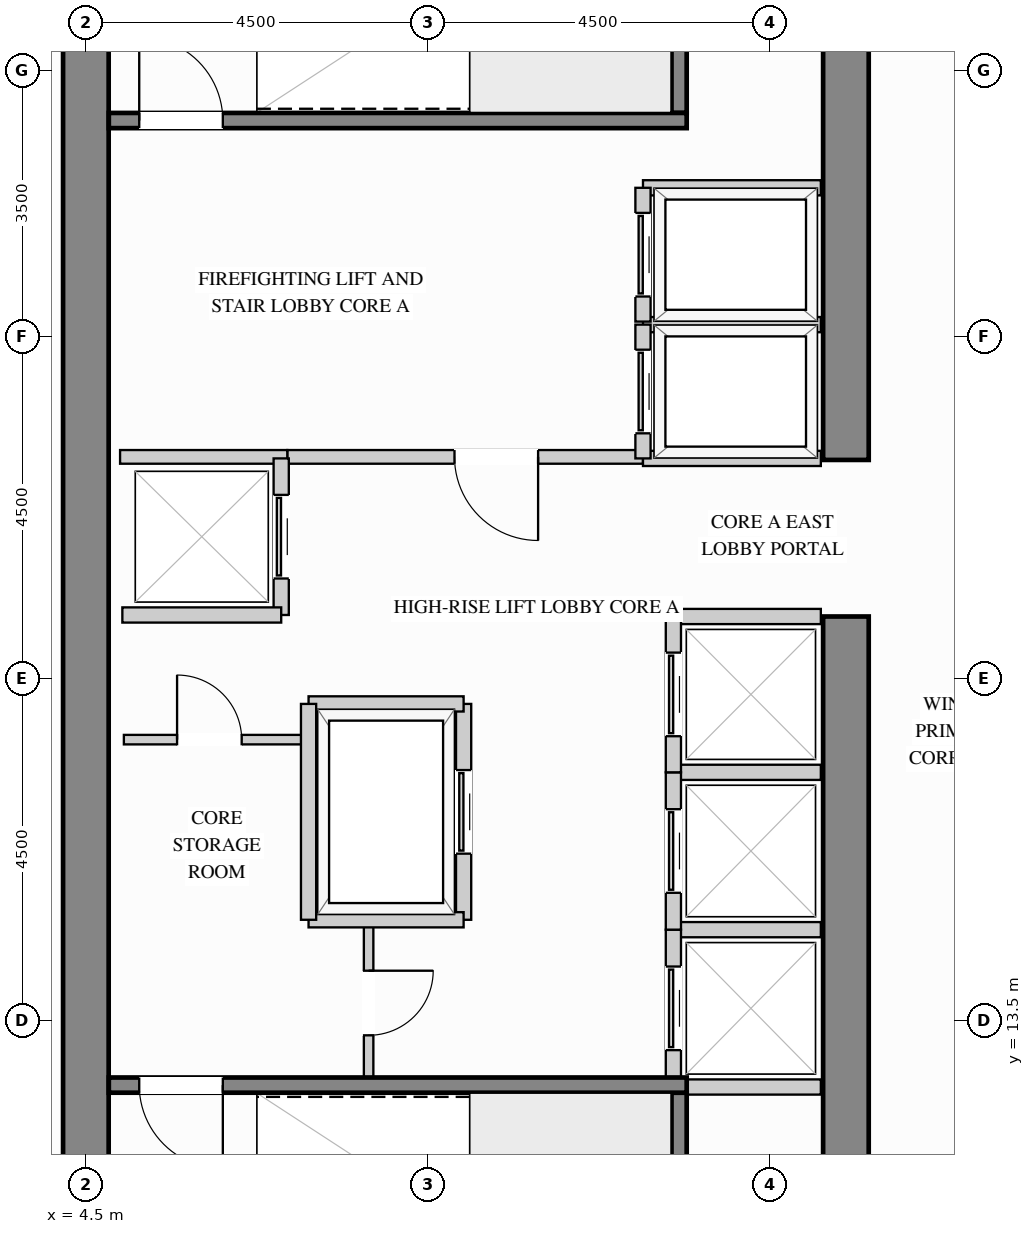
"""IFC4 building model, lengths in metres.
Left out: names, types, materials, properties, quantities, classifications, styles, units other than length and angle.
Written with IfcOpenShell. Run it as: python <this file> out.ifc"""

import sys

from ifc_helpers import new_model, si_unit, direction, frame, frame_2d, origin, place, context, subcontext, project, spatial, rectangle, extrude, source, transform, mapped, element, fill, save


model = new_model("IFC4")
c1 = context("Model", 3, precision=1e-05, world=origin(), true_north=direction((0.0, 1.0)))
c2 = subcontext(c1, "Body", "Model", "MODEL_VIEW")
j1 = project(units=[si_unit("LENGTHUNIT", "METRE"), si_unit("PLANEANGLEUNIT", "RADIAN")], contexts=[c1])
p1 = place(None, origin())
s1 = spatial("IfcSite", under=j1, at=p1, CompositionType="ELEMENT")
p2 = place(p1, origin())
s2 = spatial("IfcBuilding", under=s1, at=p2, CompositionType="ELEMENT")
p3 = place(p2, frame((0.0, 0.0, 182.7)))
s3 = spatial("IfcBuildingStorey", under=s2, at=p3, CompositionType="ELEMENT", Elevation=182.7)
m1 = source(origin(), c2, "Body", "SweptSolid", [
    extrude(rectangle(XDim=10.02, YDim=0.6, at=frame_2d((5.01, 0.0))), origin(), (0.0, 0.0, 1.0), 3.4),
])
p4 = place(p3, frame((14.5, 8.8, 0.0), z_axis=(0.0, 0.0, 1.0), x_axis=(0.0, 1.0, 0.0)))
e1 = element("IfcWall", 1, at=p4, inside=s3, PredefinedType="SHEAR", context=c2, shape_type="MappedRepresentation", body=[
    mapped(m1, transform((0.0, 0.0, 0.0), x_axis=(1.0, 0.0, 0.0), y_axis=(0.0, 1.0, 0.0), z_axis=(0.0, 0.0, 1.0))),
])
m2 = source(origin(), c2, "Body", "SweptSolid", [
    extrude(rectangle(XDim=8.32, YDim=0.6, at=frame_2d((4.16, 0.0))), origin(), (0.0, 0.0, 1.0), 3.4),
])
p5 = place(p3, frame((14.5, 20.88, 0.0), z_axis=(0.0, 0.0, 1.0), x_axis=(0.0, 1.0, 0.0)))
e2 = element("IfcWall", 2, at=p5, inside=s3, PredefinedType="SHEAR", context=c2, shape_type="MappedRepresentation", body=[
    mapped(m2, transform((0.0, 0.0, 0.0), x_axis=(1.0, 0.0, 0.0), y_axis=(0.0, 1.0, 0.0), z_axis=(0.0, 0.0, 1.0))),
])
m3 = source(origin(), c2, "Body", "SweptSolid", [
    extrude(rectangle(XDim=20.4, YDim=0.6, at=frame_2d((10.2, 0.0))), origin(), (0.0, 0.0, 1.0), 3.4),
])
p6 = place(p3, frame((4.5, 8.8, 0.0), z_axis=(0.0, 0.0, 1.0), x_axis=(0.0, 1.0, 0.0)))
e3 = element("IfcWall", 3, at=p6, inside=s3, PredefinedType="SHEAR", context=c2, shape_type="MappedRepresentation", body=[
    mapped(m3, transform((0.0, 0.0, 0.0), x_axis=(1.0, 0.0, 0.0), y_axis=(0.0, 1.0, 0.0), z_axis=(0.0, 0.0, 1.0))),
])
p7 = place(p3, frame((7.15, 20.92, 0.0), z_axis=(0.0, 0.0, 1.0), x_axis=(1.0, 0.0, 0.0)))
e4 = element("IfcWall", 4, at=p7, inside=s3, PredefinedType="PARTITIONING", context=c2, shape_type="SweptSolid", body=[
    extrude(rectangle(XDim=4.68, YDim=0.18, at=frame_2d((2.34, 0.0))), origin(), (0.0, 0.0, 1.0), 3.385),
])
p8 = place(p7, frame((2.2, 0.0, 0.0)))
e5 = element("IfcOpeningElement", 5, at=p8, cuts=e4, PredefinedType="OPENING", context=c2, shape_type="SweptSolid", body=[
    extrude(rectangle(XDim=1.1, YDim=2.15, at=frame_2d((0.55, 1.075))), frame((0.0, 0.1, 0.0), z_axis=(0.0, -1.0, 0.0), x_axis=(1.0, 0.0, 0.0)), (0.0, 0.0, 1.0), 0.2),
])
m4 = source(origin(), c2, "Body", "SweptSolid", [
    extrude(rectangle(XDim=2.2, YDim=0.18, at=frame_2d((1.1, 0.0))), origin(), (0.0, 0.0, 1.0), 3.385),
])
p9 = place(p3, frame((4.95, 20.92, 0.0), z_axis=(0.0, 0.0, 1.0), x_axis=(1.0, 0.0, 0.0)))
e6 = element("IfcWall", 6, at=p9, inside=s3, PredefinedType="PARTITIONING", context=c2, shape_type="MappedRepresentation", body=[
    mapped(m4, transform((0.0, 0.0, 0.0), x_axis=(1.0, 0.0, 0.0), y_axis=(0.0, 1.0, 0.0), z_axis=(0.0, 0.0, 1.0))),
])
p10 = place(p3, frame((8.22, 12.75, 0.0), z_axis=(0.0, 0.0, 1.0), x_axis=(0.0, 1.0, 0.0)))
e7 = element("IfcWall", 7, at=p10, inside=s3, PredefinedType="PARTITIONING", context=c2, shape_type="SweptSolid", body=[
    extrude(rectangle(XDim=2.07, YDim=0.125, at=frame_2d((1.035, 0.0))), origin(), (0.0, 0.0, 1.0), 3.385),
])
p11 = place(p10, frame((0.56, 0.0, 0.0)))
e8 = element("IfcOpeningElement", 8, at=p11, cuts=e7, PredefinedType="OPENING", context=c2, shape_type="SweptSolid", body=[
    extrude(rectangle(XDim=0.85, YDim=2.1, at=frame_2d((0.425, 1.05))), frame((0.0, 0.073, 0.0), z_axis=(0.0, -1.0, 0.0), x_axis=(1.0, 0.0, 0.0)), (0.0, 0.0, 1.0), 0.145),
])
p12 = place(p3, frame((5.0, 17.2, 0.0), z_axis=(0.0, 0.0, 1.0), x_axis=(1.0, 0.0, 0.0)))
e9 = element("IfcWall", 9, at=p12, inside=s3, PredefinedType="PARTITIONING", context=c2, shape_type="SweptSolid", body=[
    extrude(rectangle(XDim=2.4, YDim=0.125, at=frame_2d((1.2, 0.0))), origin(), (0.0, 0.0, 1.0), 3.385),
])
p13 = place(p12, frame((0.7, 0.0, 0.0)))
e10 = element("IfcOpeningElement", 10, at=p13, cuts=e9, PredefinedType="OPENING", context=c2, shape_type="SweptSolid", body=[
    extrude(rectangle(XDim=0.85, YDim=2.1, at=frame_2d((0.425, 1.05))), frame((0.0, 0.073, 0.0), z_axis=(0.0, -1.0, 0.0), x_axis=(1.0, 0.0, 0.0)), (0.0, 0.0, 1.0), 0.145),
])
m5 = source(origin(), c2, "Body", "SweptSolid", [
    extrude(rectangle(XDim=2.34, YDim=0.2, at=frame_2d((1.17, 0.0))), origin(), (0.0, 0.0, 1.0), 3.385),
])
for number, where, z_axis, x_axis in (
    (11, (11.83, 22.66, 0.0), (0.0, 0.0, 1.0), (1.0, 0.0, 0.0)),
    (12, (11.83, 20.9, 0.0), (0.0, 0.0, 1.0), (1.0, 0.0, 0.0)),
):
    element("IfcWall", number, at=place(p3, frame(where, z_axis=z_axis, x_axis=x_axis)), inside=s3, PredefinedType="PARTITIONING", context=c2, shape_type="MappedRepresentation", body=[
        mapped(m5, transform((0.0, 0.0, 0.0), x_axis=(1.0, 0.0, 0.0), y_axis=(0.0, 1.0, 0.0), z_axis=(0.0, 0.0, 1.0))),
    ])
p14 = place(p3, frame((11.83, 20.9, 0.0), z_axis=(0.0, 0.0, 1.0), x_axis=(0.0, 1.0, 0.0)))
e13 = element("IfcWall", 13, at=p14, inside=s3, PredefinedType="PARTITIONING", context=c2, shape_type="SweptSolid", body=[
    extrude(rectangle(XDim=1.76, YDim=0.2, at=frame_2d((0.88, 0.0))), origin(), (0.0, 0.0, 1.0), 3.385),
])
p15 = place(p14, frame((0.33, 0.0, 0.0)))
e14 = element("IfcOpeningElement", 14, at=p15, cuts=e13, PredefinedType="OPENING", context=c2, shape_type="SweptSolid", body=[
    extrude(rectangle(XDim=1.1, YDim=2.2, at=frame_2d((0.55, 1.1))), frame((0.0, 0.11, 0.0), z_axis=(0.0, -1.0, 0.0), x_axis=(1.0, 0.0, 0.0)), (0.0, 0.0, 1.0), 0.22),
])
p16 = place(p3, frame((11.83, 24.46, 0.0), z_axis=(0.0, 0.0, 1.0), x_axis=(1.0, 0.0, 0.0)))
e15 = element("IfcWall", 15, at=p16, inside=s3, PredefinedType="PARTITIONING", context=c2, shape_type="MappedRepresentation", body=[
    mapped(m5, transform((0.0, 0.0, 0.0), x_axis=(1.0, 0.0, 0.0), y_axis=(0.0, 1.0, 0.0), z_axis=(0.0, 0.0, 1.0))),
])
p17 = place(p3, frame((11.83, 22.7, 0.0), z_axis=(0.0, 0.0, 1.0), x_axis=(0.0, 1.0, 0.0)))
e16 = element("IfcWall", 16, at=p17, inside=s3, PredefinedType="PARTITIONING", context=c2, shape_type="SweptSolid", body=[
    extrude(rectangle(XDim=1.76, YDim=0.2, at=frame_2d((0.88, 0.0))), origin(), (0.0, 0.0, 1.0), 3.385),
])
p18 = place(p17, frame((0.33, 0.0, 0.0)))
e17 = element("IfcOpeningElement", 17, at=p18, cuts=e16, PredefinedType="OPENING", context=c2, shape_type="SweptSolid", body=[
    extrude(rectangle(XDim=1.1, YDim=2.2, at=frame_2d((0.55, 1.1))), frame((0.0, 0.11, 0.0), z_axis=(0.0, -1.0, 0.0), x_axis=(1.0, 0.0, 0.0)), (0.0, 0.0, 1.0), 0.22),
])
m6 = source(origin(), c2, "Body", "SweptSolid", [
    extrude(rectangle(XDim=1.94, YDim=0.2, at=frame_2d((0.97, 0.0))), origin(), (0.0, 0.0, 1.0), 3.385),
])
for number, where, z_axis, x_axis in (
    (18, (12.23, 14.7, 0.0), (0.0, 0.0, 1.0), (1.0, 0.0, 0.0)),
    (19, (12.23, 12.63, 0.0), (0.0, 0.0, 1.0), (1.0, 0.0, 0.0)),
):
    element("IfcWall", number, at=place(p3, frame(where, z_axis=z_axis, x_axis=x_axis)), inside=s3, PredefinedType="PARTITIONING", context=c2, shape_type="MappedRepresentation", body=[
        mapped(m6, transform((0.0, 0.0, 0.0), x_axis=(1.0, 0.0, 0.0), y_axis=(0.0, 1.0, 0.0), z_axis=(0.0, 0.0, 1.0))),
    ])
p19 = place(p3, frame((12.23, 12.63, 0.0), z_axis=(0.0, 0.0, 1.0), x_axis=(0.0, 1.0, 0.0)))
e20 = element("IfcWall", 20, at=p19, inside=s3, PredefinedType="PARTITIONING", context=c2, shape_type="SweptSolid", body=[
    extrude(rectangle(XDim=2.07, YDim=0.2, at=frame_2d((1.035, 0.0))), origin(), (0.0, 0.0, 1.0), 3.385),
])
p20 = place(p19, frame((0.485, 0.0, 0.0)))
e21 = element("IfcOpeningElement", 21, at=p20, cuts=e20, PredefinedType="OPENING", context=c2, shape_type="SweptSolid", body=[
    extrude(rectangle(XDim=1.1, YDim=2.2, at=frame_2d((0.55, 1.1))), frame((0.0, 0.11, 0.0), z_axis=(0.0, -1.0, 0.0), x_axis=(1.0, 0.0, 0.0)), (0.0, 0.0, 1.0), 0.22),
])
p21 = place(p3, frame((12.23, 16.77, 0.0), z_axis=(0.0, 0.0, 1.0), x_axis=(1.0, 0.0, 0.0)))
e22 = element("IfcWall", 22, at=p21, inside=s3, PredefinedType="PARTITIONING", context=c2, shape_type="MappedRepresentation", body=[
    mapped(m6, transform((0.0, 0.0, 0.0), x_axis=(1.0, 0.0, 0.0), y_axis=(0.0, 1.0, 0.0), z_axis=(0.0, 0.0, 1.0))),
])
p22 = place(p3, frame((12.23, 14.7, 0.0), z_axis=(0.0, 0.0, 1.0), x_axis=(0.0, 1.0, 0.0)))
e23 = element("IfcWall", 23, at=p22, inside=s3, PredefinedType="PARTITIONING", context=c2, shape_type="SweptSolid", body=[
    extrude(rectangle(XDim=2.07, YDim=0.2, at=frame_2d((1.035, 0.0))), origin(), (0.0, 0.0, 1.0), 3.385),
])
p23 = place(p22, frame((0.485, 0.0, 0.0)))
e24 = element("IfcOpeningElement", 24, at=p23, cuts=e23, PredefinedType="OPENING", context=c2, shape_type="SweptSolid", body=[
    extrude(rectangle(XDim=1.1, YDim=2.2, at=frame_2d((0.55, 1.1))), frame((0.0, 0.11, 0.0), z_axis=(0.0, -1.0, 0.0), x_axis=(1.0, 0.0, 0.0)), (0.0, 0.0, 1.0), 0.22),
])
p24 = place(p3, frame((12.23, 18.82, 0.0), z_axis=(0.0, 0.0, 1.0), x_axis=(1.0, 0.0, 0.0)))
e25 = element("IfcWall", 25, at=p24, inside=s3, PredefinedType="PARTITIONING", context=c2, shape_type="MappedRepresentation", body=[
    mapped(m6, transform((0.0, 0.0, 0.0), x_axis=(1.0, 0.0, 0.0), y_axis=(0.0, 1.0, 0.0), z_axis=(0.0, 0.0, 1.0))),
])
p25 = place(p3, frame((12.23, 16.77, 0.0), z_axis=(0.0, 0.0, 1.0), x_axis=(0.0, 1.0, 0.0)))
e26 = element("IfcWall", 26, at=p25, inside=s3, PredefinedType="PARTITIONING", context=c2, shape_type="SweptSolid", body=[
    extrude(rectangle(XDim=2.05, YDim=0.2, at=frame_2d((1.025, 0.0))), origin(), (0.0, 0.0, 1.0), 3.385),
])
p26 = place(p25, frame((0.475, 0.0, 0.0)))
e27 = element("IfcOpeningElement", 27, at=p26, cuts=e26, PredefinedType="OPENING", context=c2, shape_type="SweptSolid", body=[
    extrude(rectangle(XDim=1.1, YDim=2.2, at=frame_2d((0.55, 1.1))), frame((0.0, 0.11, 0.0), z_axis=(0.0, -1.0, 0.0), x_axis=(1.0, 0.0, 0.0)), (0.0, 0.0, 1.0), 0.22),
])
p27 = place(p3, frame((7.07, 18.84, 0.0), z_axis=(0.0, 0.0, 1.0), x_axis=(0.0, 1.0, 0.0)))
e28 = element("IfcWall", 28, at=p27, inside=s3, PredefinedType="PARTITIONING", context=c2, shape_type="SweptSolid", body=[
    extrude(rectangle(XDim=2.06, YDim=0.2, at=frame_2d((1.03, 0.0))), origin(), (0.0, 0.0, 1.0), 3.385),
])
p28 = place(p27, frame((0.48, 0.0, 0.0)))
e29 = element("IfcOpeningElement", 29, at=p28, cuts=e28, PredefinedType="OPENING", context=c2, shape_type="SweptSolid", body=[
    extrude(rectangle(XDim=1.1, YDim=2.2, at=frame_2d((0.55, 1.1))), frame((0.0, 0.11, 0.0), z_axis=(0.0, -1.0, 0.0), x_axis=(1.0, 0.0, 0.0)), (0.0, 0.0, 1.0), 0.22),
])
m7 = source(origin(), c2, "Body", "SweptSolid", [
    extrude(rectangle(XDim=2.09, YDim=0.2, at=frame_2d((1.045, 0.0))), origin(), (0.0, 0.0, 1.0), 3.385),
])
p29 = place(p3, frame((4.98, 18.84, 0.0), z_axis=(0.0, 0.0, 1.0), x_axis=(1.0, 0.0, 0.0)))
e30 = element("IfcWall", 30, at=p29, inside=s3, PredefinedType="PARTITIONING", context=c2, shape_type="MappedRepresentation", body=[
    mapped(m7, transform((0.0, 0.0, 0.0), x_axis=(1.0, 0.0, 0.0), y_axis=(0.0, 1.0, 0.0), z_axis=(0.0, 0.0, 1.0))),
])
p30 = place(p3, frame((9.47, 14.83, 0.0), z_axis=(0.0, 0.0, 1.0), x_axis=(0.0, 1.0, 0.0)))
e31 = element("IfcWall", 31, at=p30, inside=s3, PredefinedType="PARTITIONING", context=c2, shape_type="SweptSolid", body=[
    extrude(rectangle(XDim=2.84, YDim=0.2, at=frame_2d((1.42, 0.0))), origin(), (0.0, 0.0, 1.0), 3.385),
])
p31 = place(p30, frame((0.87, 0.0, 0.0)))
e32 = element("IfcOpeningElement", 32, at=p31, cuts=e31, PredefinedType="OPENING", context=c2, shape_type="SweptSolid", body=[
    extrude(rectangle(XDim=1.1, YDim=2.2, at=frame_2d((0.55, 1.1))), frame((0.0, 0.11, 0.0), z_axis=(0.0, -1.0, 0.0), x_axis=(1.0, 0.0, 0.0)), (0.0, 0.0, 1.0), 0.22),
])
m8 = source(origin(), c2, "Body", "SweptSolid", [
    extrude(rectangle(XDim=2.04, YDim=0.2, at=frame_2d((1.02, 0.0))), origin(), (0.0, 0.0, 1.0), 3.385),
])
for number, where, z_axis, x_axis in (
    (33, (7.43, 17.67, 0.0), (0.0, 0.0, 1.0), (1.0, 0.0, 0.0)),
    (34, (7.43, 14.83, 0.0), (0.0, 0.0, 1.0), (1.0, 0.0, 0.0)),
):
    element("IfcWall", number, at=place(p3, frame(where, z_axis=z_axis, x_axis=x_axis)), inside=s3, PredefinedType="PARTITIONING", context=c2, shape_type="MappedRepresentation", body=[
        mapped(m8, transform((0.0, 0.0, 0.0), x_axis=(1.0, 0.0, 0.0), y_axis=(0.0, 1.0, 0.0), z_axis=(0.0, 0.0, 1.0))),
    ])
m9 = source(origin(), c2, "Body", "SweptSolid", [
    extrude(rectangle(XDim=2.84, YDim=0.2, at=frame_2d((1.42, 0.0))), origin(), (0.0, 0.0, 1.0), 3.385),
])
p32 = place(p3, frame((7.43, 14.83, 0.0), z_axis=(0.0, 0.0, 1.0), x_axis=(0.0, 1.0, 0.0)))
e35 = element("IfcWall", 35, at=p32, inside=s3, PredefinedType="PARTITIONING", context=c2, shape_type="MappedRepresentation", body=[
    mapped(m9, transform((0.0, 0.0, 0.0), x_axis=(1.0, 0.0, 0.0), y_axis=(0.0, 1.0, 0.0), z_axis=(0.0, 0.0, 1.0))),
])
m10 = source(origin(), c2, "Body", "SweptSolid", [
    extrude(rectangle(XDim=3.753, YDim=0.2, at=frame_2d((1.876, 0.0))), origin(), (0.0, 0.0, 1.0), 3.4),
])
p33 = place(p3, frame((12.305, 8.802, 0.0), z_axis=(0.0, 0.0, 1.0), x_axis=(0.0, 1.0, 0.0)))
e36 = element("IfcWall", 36, at=p33, inside=s3, PredefinedType="SHEAR", context=c2, shape_type="MappedRepresentation", body=[
    mapped(m10, transform((0.0, 0.0, 0.0), x_axis=(1.0, 0.0, 0.0), y_axis=(0.0, 1.0, 0.0), z_axis=(0.0, 0.0, 1.0))),
])
p34 = place(p3, frame((4.802, 12.655, 0.0), z_axis=(0.0, 0.0, 1.0), x_axis=(1.0, 0.0, 0.0)))
e37 = element("IfcWall", 37, at=p34, inside=s3, PredefinedType="SHEAR", context=c2, shape_type="SweptSolid", body=[
    extrude(rectangle(XDim=7.603, YDim=0.2, at=frame_2d((3.802, 0.0))), origin(), (0.0, 0.0, 1.0), 3.4),
])
p35 = place(p34, frame((0.4, 0.0, 0.0)))
e38 = element("IfcOpeningElement", 38, at=p35, cuts=e37, PredefinedType="OPENING", context=c2, shape_type="SweptSolid", body=[
    extrude(rectangle(XDim=1.1, YDim=2.15, at=frame_2d((0.55, 1.075))), frame((0.0, 0.11, 0.0), z_axis=(0.0, -1.0, 0.0), x_axis=(1.0, 0.0, 0.0)), (0.0, 0.0, 1.0), 0.22),
])
p36 = place(p3, frame((12.305, 25.445, 0.0), z_axis=(0.0, 0.0, 1.0), x_axis=(0.0, 1.0, 0.0)))
e39 = element("IfcWall", 39, at=p36, inside=s3, PredefinedType="SHEAR", context=c2, shape_type="MappedRepresentation", body=[
    mapped(m10, transform((0.0, 0.0, 0.0), x_axis=(1.0, 0.0, 0.0), y_axis=(0.0, 1.0, 0.0), z_axis=(0.0, 0.0, 1.0))),
])
p37 = place(p3, frame((4.802, 25.345, 0.0), z_axis=(0.0, 0.0, 1.0), x_axis=(1.0, 0.0, 0.0)))
e40 = element("IfcWall", 40, at=p37, inside=s3, PredefinedType="SHEAR", context=c2, shape_type="SweptSolid", body=[
    extrude(rectangle(XDim=7.603, YDim=0.2, at=frame_2d((3.802, 0.0))), origin(), (0.0, 0.0, 1.0), 3.4),
])
p38 = place(p37, frame((0.4, 0.0, 0.0)))
e41 = element("IfcOpeningElement", 41, at=p38, cuts=e40, PredefinedType="OPENING", context=c2, shape_type="SweptSolid", body=[
    extrude(rectangle(XDim=1.1, YDim=2.15, at=frame_2d((0.55, 1.075))), frame((0.0, 0.11, 0.0), z_axis=(0.0, -1.0, 0.0), x_axis=(1.0, 0.0, 0.0)), (0.0, 0.0, 1.0), 0.22),
])
m11 = source(origin(), c2, "Body", "SweptSolid", [
    extrude(rectangle(XDim=1.1, YDim=2.15, at=frame_2d((0.55, 1.075))), frame((0.0, 0.025, 0.0), z_axis=(0.0, -1.0, 0.0), x_axis=(1.0, 0.0, 0.0)), (0.0, 0.0, 1.0), 0.05),
])
p39 = place(p8, origin())
e42 = element("IfcDoor", 42, at=p39, inside=s3, OperationType="SINGLE_SWING_RIGHT", PredefinedType="DOOR", context=c2, shape_type="MappedRepresentation", body=[
    mapped(m11, transform((0.0, 0.0, 0.0), x_axis=(1.0, 0.0, 0.0), y_axis=(0.0, 1.0, 0.0), z_axis=(0.0, 0.0, 1.0))),
])
fill(e5, e42)
m12 = source(origin(), c2, "Body", "SweptSolid", [
    extrude(rectangle(XDim=1.1, YDim=2.2, at=frame_2d((0.55, 1.1))), frame((0.0, 0.025, 0.0), z_axis=(0.0, -1.0, 0.0), x_axis=(1.0, 0.0, 0.0)), (0.0, 0.0, 1.0), 0.05),
])
p40 = place(p15, origin())
e43 = element("IfcDoor", 43, at=p40, inside=s3, OperationType="SLIDING_TO_LEFT", PredefinedType="DOOR", context=c2, shape_type="MappedRepresentation", body=[
    mapped(m12, transform((0.0, 0.0, 0.0), x_axis=(1.0, 0.0, 0.0), y_axis=(0.0, 1.0, 0.0), z_axis=(0.0, 0.0, 1.0))),
])
fill(e14, e43)
p41 = place(p18, origin())
e44 = element("IfcDoor", 44, at=p41, inside=s3, OperationType="SLIDING_TO_LEFT", PredefinedType="DOOR", context=c2, shape_type="MappedRepresentation", body=[
    mapped(m12, transform((0.0, 0.0, 0.0), x_axis=(1.0, 0.0, 0.0), y_axis=(0.0, 1.0, 0.0), z_axis=(0.0, 0.0, 1.0))),
])
fill(e17, e44)
p42 = place(p20, origin())
e45 = element("IfcDoor", 45, at=p42, inside=s3, OperationType="SLIDING_TO_LEFT", PredefinedType="DOOR", context=c2, shape_type="MappedRepresentation", body=[
    mapped(m12, transform((0.0, 0.0, 0.0), x_axis=(1.0, 0.0, 0.0), y_axis=(0.0, 1.0, 0.0), z_axis=(0.0, 0.0, 1.0))),
])
fill(e21, e45)
p43 = place(p23, origin())
e46 = element("IfcDoor", 46, at=p43, inside=s3, OperationType="SLIDING_TO_LEFT", PredefinedType="DOOR", context=c2, shape_type="MappedRepresentation", body=[
    mapped(m12, transform((0.0, 0.0, 0.0), x_axis=(1.0, 0.0, 0.0), y_axis=(0.0, 1.0, 0.0), z_axis=(0.0, 0.0, 1.0))),
])
fill(e24, e46)
p44 = place(p26, origin())
e47 = element("IfcDoor", 47, at=p44, inside=s3, OperationType="SLIDING_TO_LEFT", PredefinedType="DOOR", context=c2, shape_type="MappedRepresentation", body=[
    mapped(m12, transform((0.0, 0.0, 0.0), x_axis=(1.0, 0.0, 0.0), y_axis=(0.0, 1.0, 0.0), z_axis=(0.0, 0.0, 1.0))),
])
fill(e27, e47)
p45 = place(p28, origin())
e48 = element("IfcDoor", 48, at=p45, inside=s3, OperationType="SLIDING_TO_LEFT", PredefinedType="DOOR", context=c2, shape_type="MappedRepresentation", body=[
    mapped(m12, transform((0.0, 0.0, 0.0), x_axis=(1.0, 0.0, 0.0), y_axis=(0.0, 1.0, 0.0), z_axis=(0.0, 0.0, 1.0))),
])
fill(e29, e48)
p46 = place(p31, origin())
e49 = element("IfcDoor", 49, at=p46, inside=s3, OperationType="SLIDING_TO_LEFT", PredefinedType="DOOR", context=c2, shape_type="MappedRepresentation", body=[
    mapped(m12, transform((0.0, 0.0, 0.0), x_axis=(1.0, 0.0, 0.0), y_axis=(0.0, 1.0, 0.0), z_axis=(0.0, 0.0, 1.0))),
])
fill(e32, e49)
m13 = source(origin(), c2, "Body", "SweptSolid", [
    extrude(rectangle(XDim=0.85, YDim=2.1, at=frame_2d((0.425, 1.05))), frame((0.0, 0.025, 0.0), z_axis=(0.0, -1.0, 0.0), x_axis=(1.0, 0.0, 0.0)), (0.0, 0.0, 1.0), 0.05),
])
p47 = place(p13, origin())
e50 = element("IfcDoor", 50, at=p47, inside=s3, OperationType="SINGLE_SWING_LEFT", PredefinedType="DOOR", context=c2, shape_type="MappedRepresentation", body=[
    mapped(m13, transform((0.0, 0.0, 0.0), x_axis=(1.0, 0.0, 0.0), y_axis=(0.0, 1.0, 0.0), z_axis=(0.0, 0.0, 1.0))),
])
fill(e10, e50)
p48 = place(p11, origin())
e51 = element("IfcDoor", 51, at=p48, inside=s3, OperationType="SINGLE_SWING_RIGHT", PredefinedType="DOOR", context=c2, shape_type="MappedRepresentation", body=[
    mapped(m13, transform((0.0, 0.0, 0.0), x_axis=(1.0, 0.0, 0.0), y_axis=(0.0, 1.0, 0.0), z_axis=(0.0, 0.0, 1.0))),
])
fill(e8, e51)
m14 = source(origin(), c2, "Body", "SweptSolid", [
    extrude(rectangle(XDim=1.1, YDim=2.15, at=frame_2d((0.55, 1.075))), frame((0.0, 0.025, 0.0), z_axis=(0.0, -1.0, 0.0), x_axis=(1.0, 0.0, 0.0)), (0.0, 0.0, 1.0), 0.05),
])
p49 = place(p35, origin())
e52 = element("IfcDoor", 52, at=p49, inside=s3, OperationType="SINGLE_SWING_RIGHT", PredefinedType="DOOR", context=c2, shape_type="MappedRepresentation", body=[
    mapped(m14, transform((0.0, 0.0, 0.0), x_axis=(1.0, 0.0, 0.0), y_axis=(0.0, 1.0, 0.0), z_axis=(0.0, 0.0, 1.0))),
])
fill(e38, e52)
p50 = place(p38, origin())
e53 = element("IfcDoor", 53, at=p50, inside=s3, OperationType="SINGLE_SWING_LEFT", PredefinedType="DOOR", context=c2, shape_type="MappedRepresentation", body=[
    mapped(m14, transform((0.0, 0.0, 0.0), x_axis=(1.0, 0.0, 0.0), y_axis=(0.0, 1.0, 0.0), z_axis=(0.0, 0.0, 1.0))),
])
fill(e41, e53)
save(model, sys.argv[1])
